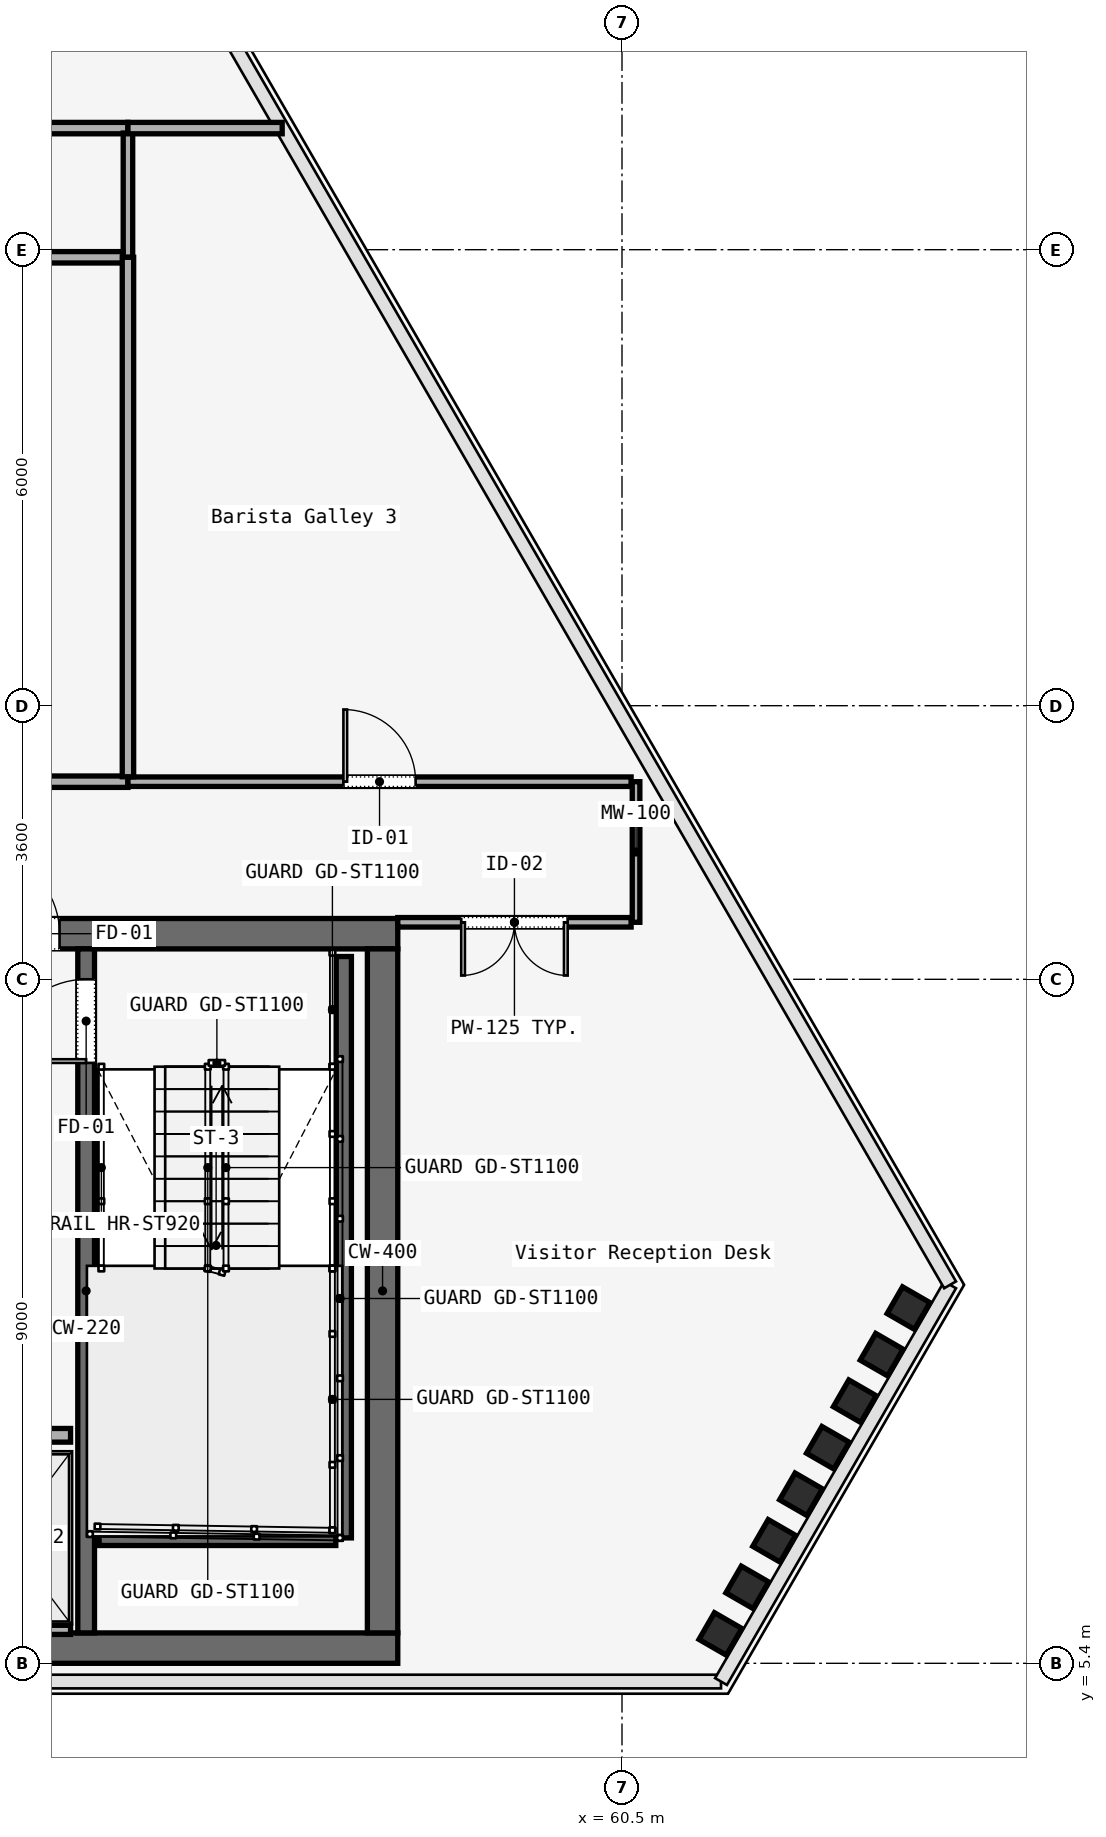
"""IFC4 building model, lengths in metres.
Left out: names, types, materials, properties, quantities, classifications, styles, units other than length and angle.
Written with IfcOpenShell. Run it as: python <this file> out.ifc"""

import sys

from ifc_helpers import new_model, si_unit, direction, frame, frame_2d, origin, origin_2d, place, context, subcontext, project, spatial, rectangle, i_section, extrude, element, fill, save


model = new_model("IFC4")
c1 = context("Model", 3, precision=1e-05, world=origin(), true_north=direction((0.0, 1.0)))
c2 = subcontext(c1, "Body", "Model", "MODEL_VIEW")
j1 = project(units=[si_unit("LENGTHUNIT", "METRE"), si_unit("PLANEANGLEUNIT", "RADIAN")], contexts=[c1])
p1 = place(None, origin())
s1 = spatial("IfcSite", under=j1, at=p1, CompositionType="ELEMENT")
p2 = place(p1, origin())
s2 = spatial("IfcBuilding", under=s1, at=p2, CompositionType="ELEMENT")
p3 = place(p2, frame((0.0, 0.0, 256.0)))
s3 = spatial("IfcBuildingStorey", under=s2, at=p3, CompositionType="ELEMENT", Elevation=256.0)
p4 = place(p3, frame((26.45, 15.0, 0.0), z_axis=(0.0, 0.0, 1.0), x_axis=(1.0, 0.0, 0.0)))
e1 = element("IfcWall", 1, at=p4, inside=s3, PredefinedType="SOLIDWALL", context=c2, shape_type="SweptSolid", body=[
    extrude(rectangle(XDim=31.1, YDim=0.4, at=frame_2d((15.55, 0.0))), origin(), (0.0, 0.0, 1.0), 3.58),
])
p5 = place(p4, frame((1.65, 0.0, 0.0)))
e2 = element("IfcOpeningElement", 2, at=p5, cuts=e1, PredefinedType="OPENING", context=c2, shape_type="SweptSolid", body=[
    extrude(rectangle(XDim=1.1, YDim=2.2, at=frame_2d((0.55, 1.1))), frame((0.0, 0.2, 0.0), z_axis=(0.0, -1.0, 0.0), x_axis=(1.0, 0.0, 0.0)), (0.0, 0.0, 1.0), 0.4),
])
p6 = place(p4, frame((13.65, 0.0, 0.0)))
e3 = element("IfcOpeningElement", 3, at=p6, cuts=e1, PredefinedType="OPENING", context=c2, shape_type="SweptSolid", body=[
    extrude(rectangle(XDim=1.1, YDim=2.2, at=frame_2d((0.55, 1.1))), frame((0.0, 0.2, 0.0), z_axis=(0.0, -1.0, 0.0), x_axis=(1.0, 0.0, 0.0)), (0.0, 0.0, 1.0), 0.4),
])
p7 = place(p4, frame((25.55, 0.0, 0.0)))
e4 = element("IfcOpeningElement", 4, at=p7, cuts=e1, PredefinedType="OPENING", context=c2, shape_type="SweptSolid", body=[
    extrude(rectangle(XDim=1.1, YDim=2.2, at=frame_2d((0.55, 1.1))), frame((0.0, 0.2, 0.0), z_axis=(0.0, -1.0, 0.0), x_axis=(1.0, 0.0, 0.0)), (0.0, 0.0, 1.0), 0.4),
])
p8 = place(p4, frame((19.35, 0.0, 0.0)))
e5 = element("IfcOpeningElement", 5, at=p8, cuts=e1, PredefinedType="OPENING", context=c2, shape_type="SweptSolid", body=[
    extrude(rectangle(XDim=1.1, YDim=2.2, at=frame_2d((0.55, 1.1))), frame((0.0, 0.2, 0.0), z_axis=(0.0, -1.0, 0.0), x_axis=(1.0, 0.0, 0.0)), (0.0, 0.0, 1.0), 0.4),
])
p9 = place(p4, frame((21.4, 0.0, 0.0)))
e6 = element("IfcOpeningElement", 6, at=p9, cuts=e1, PredefinedType="OPENING", context=c2, shape_type="SweptSolid", body=[
    extrude(rectangle(XDim=0.9, YDim=2.1, at=frame_2d((0.45, 1.05))), frame((0.0, 0.2, 0.0), z_axis=(0.0, -1.0, 0.0), x_axis=(1.0, 0.0, 0.0)), (0.0, 0.0, 1.0), 0.4),
])
p10 = place(p4, frame((6.04, 0.0, 0.0)))
e7 = element("IfcOpeningElement", 7, at=p10, cuts=e1, PredefinedType="OPENING", context=c2, shape_type="SweptSolid", body=[
    extrude(rectangle(XDim=0.95, YDim=2.2, at=frame_2d((0.475, 1.1))), frame((0.0, 0.2, 0.0), z_axis=(0.0, -1.0, 0.0), x_axis=(1.0, 0.0, 0.0)), (0.0, 0.0, 1.0), 0.4),
])
p11 = place(p4, frame((9.99, 0.0, 0.0)))
e8 = element("IfcOpeningElement", 8, at=p11, cuts=e1, PredefinedType="OPENING", context=c2, shape_type="SweptSolid", body=[
    extrude(rectangle(XDim=0.95, YDim=2.2, at=frame_2d((0.475, 1.1))), frame((0.0, 0.2, 0.0), z_axis=(0.0, -1.0, 0.0), x_axis=(1.0, 0.0, 0.0)), (0.0, 0.0, 1.0), 0.4),
])
p12 = place(p4, frame((23.35, 0.0, 0.0)))
e9 = element("IfcOpeningElement", 9, at=p12, cuts=e1, PredefinedType="OPENING", context=c2, shape_type="SweptSolid", body=[
    extrude(rectangle(XDim=1.3, YDim=2.3, at=frame_2d((0.65, 1.15))), frame((0.0, 0.2, 0.0), z_axis=(0.0, -1.0, 0.0), x_axis=(1.0, 0.0, 0.0)), (0.0, 0.0, 1.0), 0.4),
])
p13 = place(p3, frame((26.45, 5.6, 0.0), z_axis=(0.0, 0.0, 1.0), x_axis=(1.0, 0.0, 0.0)))
e10 = element("IfcWall", 10, at=p13, inside=s3, PredefinedType="SOLIDWALL", context=c2, shape_type="SweptSolid", body=[
    extrude(rectangle(XDim=31.1, YDim=0.4, at=frame_2d((15.55, 0.0))), origin(), (0.0, 0.0, 1.0), 3.58),
])
p14 = place(p3, frame((57.35, 5.8, 0.0), z_axis=(0.0, 0.0, 1.0), x_axis=(0.0, 1.0, 0.0)))
e11 = element("IfcWall", 11, at=p14, inside=s3, PredefinedType="SOLIDWALL", context=c2, shape_type="SweptSolid", body=[
    extrude(rectangle(XDim=9.0, YDim=0.4, at=frame_2d((4.5, 0.0))), origin(), (0.0, 0.0, 1.0), 3.58),
])
p15 = place(p3, frame((53.45, 5.8, 0.0), z_axis=(0.0, 0.0, 1.0), x_axis=(0.0, 1.0, 0.0)))
e12 = element("IfcWall", 12, at=p15, inside=s3, PredefinedType="SOLIDWALL", context=c2, shape_type="SweptSolid", body=[
    extrude(rectangle(XDim=9.0, YDim=0.22, at=frame_2d((4.5, 0.0))), origin(), (0.0, 0.0, 1.0), 3.58),
])
p16 = place(p15, frame((7.5, 0.0, 0.0)))
e13 = element("IfcOpeningElement", 13, at=p16, cuts=e12, PredefinedType="OPENING", context=c2, shape_type="SweptSolid", body=[
    extrude(rectangle(XDim=1.1, YDim=2.2, at=frame_2d((0.55, 1.1))), frame((0.0, 0.11, 0.0), z_axis=(0.0, -1.0, 0.0), x_axis=(1.0, 0.0, 0.0)), (0.0, 0.0, 1.0), 0.22),
])
for number, where, z_axis, x_axis in (
    (14, (61.795, 5.786, 0.0), (0.0, 0.0, 1.0), (0.5, 0.866, 0.0)),
    (15, (62.149, 6.399, 0.0), (0.0, 0.0, 1.0), (0.5, 0.866, 0.0)),
    (16, (62.502, 7.011, 0.0), (0.0, 0.0, 1.0), (0.5, 0.866, 0.0)),
    (17, (62.856, 7.624, 0.0), (0.0, 0.0, 1.0), (0.5, 0.866, 0.0)),
    (18, (63.209, 8.236, 0.0), (0.0, 0.0, 1.0), (0.5, 0.866, 0.0)),
    (19, (63.563, 8.849, 0.0), (0.0, 0.0, 1.0), (0.5, 0.866, 0.0)),
    (20, (63.917, 9.461, 0.0), (0.0, 0.0, 1.0), (0.5, 0.866, 0.0)),
    (21, (64.27, 10.073, 0.0), (0.0, 0.0, 1.0), (0.5, 0.866, 0.0)),
):
    element("IfcColumn", number, at=place(p3, frame(where, z_axis=z_axis, x_axis=x_axis)), inside=s3, PredefinedType="COLUMN", context=c2, shape_type="SweptSolid", body=[
        extrude(i_section(OverallWidth=0.406, OverallDepth=0.416, WebThickness=0.03, FlangeThickness=0.037, FilletRadius=0.015, at=origin_2d()), origin(), (0.0, 0.0, 1.0), 3.58),
    ])
p17 = place(p3, frame((56.84, 14.7, 0.0), z_axis=(0.0, 0.0, 1.0), x_axis=(0.0, -1.0, 0.0)))
e22 = element("IfcWall", 22, at=p17, inside=s3, PredefinedType="SOLIDWALL", context=c2, shape_type="SweptSolid", body=[
    extrude(rectangle(XDim=7.65, YDim=0.2, at=frame_2d((3.825, 0.0))), origin(), (0.0, 0.0, 1.0), 3.8),
])
p18 = place(p3, frame((53.62, 7.05, 0.0), z_axis=(0.0, 0.0, 1.0), x_axis=(1.0, 0.0, 0.0)))
e23 = element("IfcWall", 23, at=p18, inside=s3, PredefinedType="SOLIDWALL", context=c2, shape_type="SweptSolid", body=[
    extrude(rectangle(XDim=3.115, YDim=0.2, at=frame_2d((1.558, 0.0))), origin(), (0.0, 0.0, 1.0), 3.8),
])
p19 = place(p3, frame((51.555, 8.4, 0.0), z_axis=(0.0, 0.0, 1.0), x_axis=(1.0, 0.0, 0.0)))
e24 = element("IfcWall", 24, at=p19, inside=s3, PredefinedType="SOLIDWALL", context=c2, shape_type="SweptSolid", body=[
    extrude(rectangle(XDim=1.69, YDim=0.18, at=frame_2d((0.845, 0.0))), origin(), (0.0, 0.0, 1.0), 3.01),
])
p20 = place(p19, frame((0.295, 0.0, 0.0)))
e25 = element("IfcOpeningElement", 25, at=p20, cuts=e24, PredefinedType="OPENING", context=c2, shape_type="SweptSolid", body=[
    extrude(rectangle(XDim=1.1, YDim=2.2, at=frame_2d((0.55, 1.1))), frame((0.0, 0.09, 0.0), z_axis=(0.0, -1.0, 0.0), x_axis=(1.0, 0.0, 0.0)), (0.0, 0.0, 1.0), 0.18),
])
p21 = place(p3, frame((51.555, 5.84, 0.0), z_axis=(0.0, 0.0, 1.0), x_axis=(1.0, 0.0, 0.0)))
e26 = element("IfcWall", 26, at=p21, inside=s3, PredefinedType="SOLIDWALL", context=c2, shape_type="SweptSolid", body=[
    extrude(rectangle(XDim=1.69, YDim=0.12, at=frame_2d((0.845, 0.0))), origin(), (0.0, 0.0, 1.0), 3.01),
])
p22 = place(p3, frame((60.685, 17.0, 0.0), z_axis=(0.0, 0.0, 1.0), x_axis=(0.0, -1.0, 0.0)))
e27 = element("IfcWall", 27, at=p22, inside=s3, PredefinedType="MOVABLE", context=c2, shape_type="SweptSolid", body=[
    extrude(rectangle(XDim=1.85, YDim=0.1, at=frame_2d((0.925, 0.0))), origin(), (0.0, 0.0, 1.0), 3.01),
])
p23 = place(p3, frame((60.62, 15.15, 0.0), z_axis=(0.0, 0.0, 1.0), x_axis=(-1.0, 0.0, 0.0)))
e28 = element("IfcWall", 28, at=p23, inside=s3, PredefinedType="PARTITIONING", context=c2, shape_type="SweptSolid", body=[
    extrude(rectangle(XDim=3.07, YDim=0.125, at=frame_2d((1.535, 0.0))), origin(), (0.0, 0.0, 1.0), 3.01),
])
p24 = place(p23, frame((0.835, 0.0, 0.0)))
e29 = element("IfcOpeningElement", 29, at=p24, cuts=e28, PredefinedType="OPENING", context=c2, shape_type="SweptSolid", body=[
    extrude(rectangle(XDim=1.4, YDim=2.2, at=frame_2d((0.7, 1.1))), frame((0.0, 0.062, 0.0), z_axis=(0.0, -1.0, 0.0), x_axis=(1.0, 0.0, 0.0)), (0.0, 0.0, 1.0), 0.125),
])
p25 = place(p3, frame((50.71, 25.6, 0.0), z_axis=(0.0, 0.0, 1.0), x_axis=(1.0, 0.0, 0.0)))
e30 = element("IfcWall", 30, at=p25, inside=s3, PredefinedType="PARTITIONING", context=c2, shape_type="SweptSolid", body=[
    extrude(rectangle(XDim=3.29, YDim=0.15, at=frame_2d((1.645, 0.0))), origin(), (0.0, 0.0, 1.0), 3.01),
])
p26 = place(p25, frame((1.195, 0.0, 0.0)))
e31 = element("IfcOpeningElement", 31, at=p26, cuts=e30, PredefinedType="OPENING", context=c2, shape_type="SweptSolid", body=[
    extrude(rectangle(XDim=0.9, YDim=2.15, at=frame_2d((0.45, 1.075))), frame((0.0, 0.075, 0.0), z_axis=(0.0, -1.0, 0.0), x_axis=(1.0, 0.0, 0.0)), (0.0, 0.0, 1.0), 0.15),
])
p27 = place(p3, frame((54.0, 25.535, 0.0), z_axis=(0.0, 0.0, 1.0), x_axis=(0.0, -1.0, 0.0)))
e32 = element("IfcWall", 32, at=p27, inside=s3, PredefinedType="PARTITIONING", context=c2, shape_type="SweptSolid", body=[
    extrude(rectangle(XDim=1.635, YDim=0.125, at=frame_2d((0.817, 0.0))), origin(), (0.0, 0.0, 1.0), 3.01),
])
p28 = place(p3, frame((53.935, 23.9, 0.0), z_axis=(0.0, 0.0, 1.0), x_axis=(-1.0, 0.0, 0.0)))
e33 = element("IfcWall", 33, at=p28, inside=s3, PredefinedType="PARTITIONING", context=c2, shape_type="SweptSolid", body=[
    extrude(rectangle(XDim=11.085, YDim=0.15, at=frame_2d((5.542, 0.0))), origin(), (0.0, 0.0, 1.0), 3.01),
])
p29 = place(p28, frame((5.067, 0.0, 0.0)))
e34 = element("IfcOpeningElement", 34, at=p29, cuts=e33, PredefinedType="OPENING", context=c2, shape_type="SweptSolid", body=[
    extrude(rectangle(XDim=0.95, YDim=2.2, at=frame_2d((0.475, 1.1))), frame((0.0, 0.075, 0.0), z_axis=(0.0, -1.0, 0.0), x_axis=(1.0, 0.0, 0.0)), (0.0, 0.0, 1.0), 0.15),
])
p30 = place(p3, frame((42.915, 17.0, 0.0), z_axis=(0.0, 0.0, 1.0), x_axis=(1.0, 0.0, 0.0)))
e35 = element("IfcWall", 35, at=p30, inside=s3, PredefinedType="PARTITIONING", context=c2, shape_type="SweptSolid", body=[
    extrude(rectangle(XDim=11.085, YDim=0.15, at=frame_2d((5.542, 0.0))), origin(), (0.0, 0.0, 1.0), 3.01),
])
p31 = place(p3, frame((54.0, 17.0, 0.0), z_axis=(0.0, 0.0, 1.0), x_axis=(1.0, 0.0, 0.0)))
e36 = element("IfcWall", 36, at=p31, inside=s3, PredefinedType="PARTITIONING", context=c2, shape_type="SweptSolid", body=[
    extrude(rectangle(XDim=6.62, YDim=0.125, at=frame_2d((3.31, 0.0))), origin(), (0.0, 0.0, 1.0), 3.01),
])
p32 = place(p31, frame((2.835, 0.0, 0.0)))
e37 = element("IfcOpeningElement", 37, at=p32, cuts=e36, PredefinedType="OPENING", context=c2, shape_type="SweptSolid", body=[
    extrude(rectangle(XDim=0.95, YDim=2.2, at=frame_2d((0.475, 1.1))), frame((0.0, 0.062, 0.0), z_axis=(0.0, -1.0, 0.0), x_axis=(1.0, 0.0, 0.0)), (0.0, 0.0, 1.0), 0.125),
])
p33 = place(p3, frame((54.0, 23.9, 0.0), z_axis=(0.0, 0.0, 1.0), x_axis=(0.0, -1.0, 0.0)))
e38 = element("IfcWall", 38, at=p33, inside=s3, PredefinedType="PARTITIONING", context=c2, shape_type="SweptSolid", body=[
    extrude(rectangle(XDim=6.835, YDim=0.15, at=frame_2d((3.417, 0.0))), origin(), (0.0, 0.0, 1.0), 3.01),
])
p34 = place(p3, frame((54.0, 25.6, 0.0), z_axis=(0.0, 0.0, 1.0), x_axis=(1.0, 0.0, 0.0)))
e39 = element("IfcWall", 39, at=p34, inside=s3, PredefinedType="PARTITIONING", context=c2, shape_type="SweptSolid", body=[
    extrude(rectangle(XDim=2.029, YDim=0.15, at=frame_2d((1.015, 0.0))), origin(), (0.0, 0.0, 1.0), 3.01),
])
p35 = place(p7, origin())
e40 = element("IfcDoor", 40, at=p35, inside=s3, OperationType="SINGLE_SWING_RIGHT", PredefinedType="DOOR", context=c2, shape_type="SweptSolid", body=[
    extrude(rectangle(XDim=1.1, YDim=2.2, at=frame_2d((0.55, 1.1))), frame((0.0, 0.025, 0.0), z_axis=(0.0, -1.0, 0.0), x_axis=(1.0, 0.0, 0.0)), (0.0, 0.0, 1.0), 0.05),
])
fill(e4, e40)
p36 = place(p16, origin())
e41 = element("IfcDoor", 41, at=p36, inside=s3, OperationType="SINGLE_SWING_LEFT", PredefinedType="DOOR", context=c2, shape_type="SweptSolid", body=[
    extrude(rectangle(XDim=1.1, YDim=2.2, at=frame_2d((0.55, 1.1))), frame((0.0, 0.025, 0.0), z_axis=(0.0, -1.0, 0.0), x_axis=(1.0, 0.0, 0.0)), (0.0, 0.0, 1.0), 0.05),
])
fill(e13, e41)
p37 = place(p24, origin())
e42 = element("IfcDoor", 42, at=p37, inside=s3, OperationType="SINGLE_SWING_RIGHT", PredefinedType="DOOR", context=c2, shape_type="SweptSolid", body=[
    extrude(rectangle(XDim=1.4, YDim=2.2, at=frame_2d((0.7, 1.1))), frame((0.0, 0.025, 0.0), z_axis=(0.0, -1.0, 0.0), x_axis=(1.0, 0.0, 0.0)), (0.0, 0.0, 1.0), 0.05),
])
fill(e29, e42)
p38 = place(p32, origin())
e43 = element("IfcDoor", 43, at=p38, inside=s3, OperationType="SINGLE_SWING_RIGHT", PredefinedType="DOOR", context=c2, shape_type="SweptSolid", body=[
    extrude(rectangle(XDim=0.95, YDim=2.2, at=frame_2d((0.475, 1.1))), frame((0.0, 0.025, 0.0), z_axis=(0.0, -1.0, 0.0), x_axis=(1.0, 0.0, 0.0)), (0.0, 0.0, 1.0), 0.05),
])
fill(e37, e43)
save(model, sys.argv[1])
